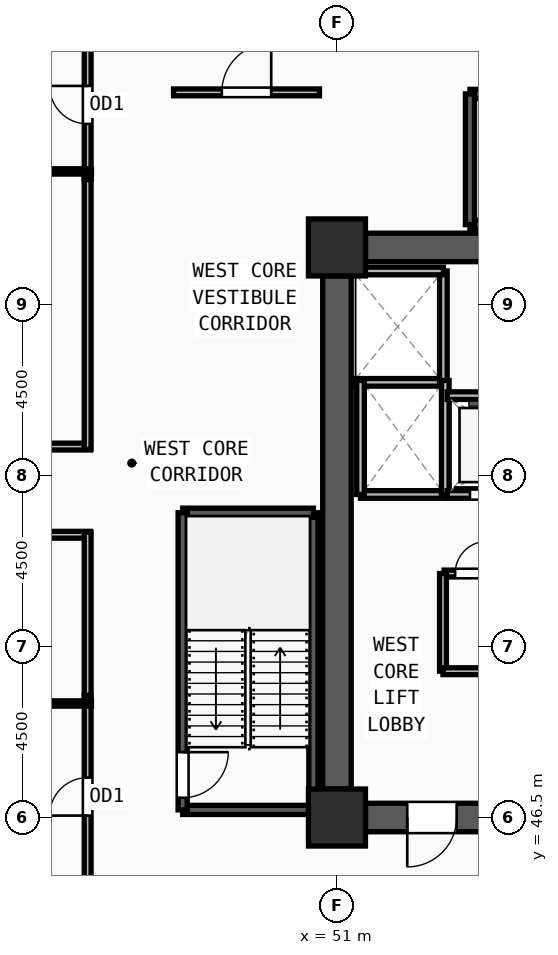
"""IFC4 building model, lengths in metres.
Left out: names, types, materials, properties, quantities, classifications, styles, units other than length and angle.
Written with IfcOpenShell. Run it as: python <this file> out.ifc"""

import sys

from ifc_helpers import new_model, si_unit, direction, frame, frame_2d, origin, origin_2d, place, context, subcontext, project, spatial, rectangle, extrude, source, transform, mapped, element, fill, save


model = new_model("IFC4")
c1 = context("Model", 3, precision=1e-05, world=origin(), true_north=direction((0.0, 1.0)))
c2 = subcontext(c1, "Body", "Model", "MODEL_VIEW")
j1 = project(units=[si_unit("LENGTHUNIT", "METRE"), si_unit("PLANEANGLEUNIT", "RADIAN")], contexts=[c1])
p1 = place(None, origin())
s1 = spatial("IfcSite", under=j1, at=p1, CompositionType="ELEMENT")
p2 = place(p1, origin())
s2 = spatial("IfcBuilding", under=s1, at=p2, CompositionType="ELEMENT")
p3 = place(p2, frame((0.0, 0.0, 177.75)))
s3 = spatial("IfcBuildingStorey", under=s2, at=p3, CompositionType="ELEMENT", Elevation=177.75)
m1 = source(origin(), c2, "Body", "SweptSolid", [
    extrude(rectangle(XDim=1.5, YDim=1.5, at=origin_2d()), origin(), (0.0, 0.0, 1.0), 3.75),
])
for number, where, z_axis, x_axis in (
    (1, (51.0, 46.5, 0.0), (0.0, 0.0, 1.0), (1.0, 0.0, 0.0)),
    (2, (51.0, 61.5, 0.0), (0.0, 0.0, 1.0), (1.0, 0.0, 0.0)),
):
    element("IfcColumn", number, at=place(p3, frame(where, z_axis=z_axis, x_axis=x_axis)), inside=s3, PredefinedType="COLUMN", context=c2, shape_type="MappedRepresentation", body=[
        mapped(m1, transform((0.0, 0.0, 0.0), x_axis=(1.0, 0.0, 0.0), y_axis=(0.0, 1.0, 0.0), z_axis=(0.0, 0.0, 1.0), scale=1.0)),
    ])
p4 = place(p3, frame((51.75, 61.5, 0.0), z_axis=(0.0, 0.0, 1.0), x_axis=(1.0, 0.0, 0.0)))
e3 = element("IfcWall", 3, at=p4, inside=s3, PredefinedType="SHEAR", context=c2, shape_type="SweptSolid", body=[
    extrude(rectangle(XDim=7.5, YDim=0.75, at=frame_2d((3.75, 0.0))), origin(), (0.0, 0.0, 1.0), 3.57),
])
p5 = place(p3, frame((59.25, 46.5, 0.0), z_axis=(0.0, 0.0, 1.0), x_axis=(-1.0, 0.0, 0.0)))
e4 = element("IfcWall", 4, at=p5, inside=s3, PredefinedType="SHEAR", context=c2, shape_type="SweptSolid", body=[
    extrude(rectangle(XDim=7.5, YDim=0.75, at=frame_2d((3.75, 0.0))), origin(), (0.0, 0.0, 1.0), 3.57),
])
m2 = source(origin(), c2, "Body", "SweptSolid", [
    extrude(rectangle(XDim=1.3, YDim=2.2, at=frame_2d((0.65, 1.1))), frame((0.0, 0.385, 0.0), z_axis=(0.0, -1.0, 0.0), x_axis=(1.0, 0.0, 0.0)), (0.0, 0.0, 1.0), 0.77),
])
p6 = place(p5, frame((5.1, 0.0, 0.0)))
e5 = element("IfcOpeningElement", 5, at=p6, cuts=e4, PredefinedType="OPENING", context=c2, shape_type="MappedRepresentation", body=[
    mapped(m2, transform((0.0, 0.0, 0.0), x_axis=(1.0, 0.0, 0.0), y_axis=(0.0, 1.0, 0.0), z_axis=(0.0, 0.0, 1.0), scale=1.0)),
])
m3 = source(origin(), c2, "Body", "SweptSolid", [
    extrude(rectangle(XDim=1.0, YDim=2.2, at=frame_2d((0.5, 1.1))), frame((0.0, 0.385, 0.0), z_axis=(0.0, -1.0, 0.0), x_axis=(1.0, 0.0, 0.0)), (0.0, 0.0, 1.0), 0.77),
])
p7 = place(p5, frame((0.6, 0.0, 0.0)))
e6 = element("IfcOpeningElement", 6, at=p7, cuts=e4, PredefinedType="OPENING", context=c2, shape_type="MappedRepresentation", body=[
    mapped(m3, transform((0.0, 0.0, 0.0), x_axis=(1.0, 0.0, 0.0), y_axis=(0.0, 1.0, 0.0), z_axis=(0.0, 0.0, 1.0), scale=1.0)),
])
p8 = place(p3, frame((51.0, 47.25, 0.0), z_axis=(0.0, 0.0, 1.0), x_axis=(0.0, 1.0, 0.0)))
e7 = element("IfcWall", 7, at=p8, inside=s3, PredefinedType="SHEAR", context=c2, shape_type="SweptSolid", body=[
    extrude(rectangle(XDim=13.5, YDim=0.75, at=frame_2d((6.75, 0.0))), origin(), (0.0, 0.0, 1.0), 3.57),
])
p9 = place(p3, frame((46.94, 46.7, 0.0), z_axis=(0.0, 0.0, 1.0), x_axis=(1.0, 0.0, 0.0)))
e8 = element("IfcWall", 8, at=p9, inside=s3, PredefinedType="SOLIDWALL", context=c2, shape_type="SweptSolid", body=[
    extrude(rectangle(XDim=3.44, YDim=0.24, at=frame_2d((1.72, 0.0))), origin(), (0.0, 0.0, 1.0), 3.57),
])
p10 = place(p3, frame((50.38, 46.7, 0.0), z_axis=(0.0, 0.0, 1.0), x_axis=(0.0, 1.0, 0.0)))
e9 = element("IfcWall", 9, at=p10, inside=s3, PredefinedType="SOLIDWALL", context=c2, shape_type="SweptSolid", body=[
    extrude(rectangle(XDim=7.82, YDim=0.24, at=frame_2d((3.91, 0.0))), origin(), (0.0, 0.0, 1.0), 3.57),
])
p11 = place(p3, frame((50.38, 54.52, 0.0), z_axis=(0.0, 0.0, 1.0), x_axis=(-1.0, 0.0, 0.0)))
e10 = element("IfcWall", 10, at=p11, inside=s3, PredefinedType="SOLIDWALL", context=c2, shape_type="SweptSolid", body=[
    extrude(rectangle(XDim=3.44, YDim=0.24, at=frame_2d((1.72, 0.0))), origin(), (0.0, 0.0, 1.0), 3.57),
])
p12 = place(p3, frame((46.94, 54.52, 0.0), z_axis=(0.0, 0.0, 1.0), x_axis=(0.0, -1.0, 0.0)))
e11 = element("IfcWall", 11, at=p12, inside=s3, PredefinedType="SOLIDWALL", context=c2, shape_type="SweptSolid", body=[
    extrude(rectangle(XDim=7.82, YDim=0.24, at=frame_2d((3.91, 0.0))), origin(), (0.0, 0.0, 1.0), 3.57),
])
m4 = source(origin(), c2, "Body", "SweptSolid", [
    extrude(rectangle(XDim=1.2, YDim=2.2, at=frame_2d((0.6, 1.1))), frame((0.0, 0.13, 0.0), z_axis=(0.0, -1.0, 0.0), x_axis=(1.0, 0.0, 0.0)), (0.0, 0.0, 1.0), 0.26),
])
p13 = place(p12, frame((6.3, 0.0, 0.0)))
e12 = element("IfcOpeningElement", 12, at=p13, cuts=e11, PredefinedType="OPENING", context=c2, shape_type="MappedRepresentation", body=[
    mapped(m4, transform((0.0, 0.0, 0.0), x_axis=(1.0, 0.0, 0.0), y_axis=(0.0, 1.0, 0.0), z_axis=(0.0, 0.0, 1.0), scale=1.0)),
])
p14 = place(p3, frame((54.5, 62.1, 0.0), z_axis=(0.0, 0.0, 1.0), x_axis=(1.0, 0.0, 0.0)))
e13 = element("IfcWall", 13, at=p14, inside=s3, PredefinedType="SOLIDWALL", context=c2, shape_type="SweptSolid", body=[
    extrude(rectangle(XDim=7.82, YDim=0.24, at=frame_2d((3.91, 0.0))), origin(), (0.0, 0.0, 1.0), 3.57),
])
p15 = place(p3, frame((62.32, 65.54, 0.0), z_axis=(0.0, 0.0, 1.0), x_axis=(-1.0, 0.0, 0.0)))
e14 = element("IfcWall", 14, at=p15, inside=s3, PredefinedType="SOLIDWALL", context=c2, shape_type="SweptSolid", body=[
    extrude(rectangle(XDim=7.82, YDim=0.24, at=frame_2d((3.91, 0.0))), origin(), (0.0, 0.0, 1.0), 3.57),
])
p16 = place(p15, frame((6.3, 0.0, 0.0)))
e15 = element("IfcOpeningElement", 15, at=p16, cuts=e14, PredefinedType="OPENING", context=c2, shape_type="MappedRepresentation", body=[
    mapped(m4, transform((0.0, 0.0, 0.0), x_axis=(1.0, 0.0, 0.0), y_axis=(0.0, 1.0, 0.0), z_axis=(0.0, 0.0, 1.0), scale=1.0)),
])
p17 = place(p3, frame((54.5, 65.54, 0.0), z_axis=(0.0, 0.0, 1.0), x_axis=(0.0, -1.0, 0.0)))
e16 = element("IfcWall", 16, at=p17, inside=s3, PredefinedType="SOLIDWALL", context=c2, shape_type="SweptSolid", body=[
    extrude(rectangle(XDim=3.44, YDim=0.24, at=frame_2d((1.72, 0.0))), origin(), (0.0, 0.0, 1.0), 3.57),
])
p18 = place(p3, frame((51.4, 57.95, 0.0), z_axis=(0.0, 0.0, 1.0), x_axis=(1.0, 0.0, 0.0)))
e17 = element("IfcWall", 17, at=p18, inside=s3, PredefinedType="SOLIDWALL", context=c2, shape_type="SweptSolid", body=[
    extrude(rectangle(XDim=2.4, YDim=0.2, at=frame_2d((1.2, 0.0))), origin(), (0.0, 0.0, 1.0), 3.57),
])
p19 = place(p3, frame((53.8, 57.95, 0.0), z_axis=(0.0, 0.0, 1.0), x_axis=(0.0, 1.0, 0.0)))
e18 = element("IfcWall", 18, at=p19, inside=s3, PredefinedType="SOLIDWALL", context=c2, shape_type="SweptSolid", body=[
    extrude(rectangle(XDim=2.93, YDim=0.2, at=frame_2d((1.465, 0.0))), origin(), (0.0, 0.0, 1.0), 3.57),
])
p20 = place(p3, frame((53.8, 60.88, 0.0), z_axis=(0.0, 0.0, 1.0), x_axis=(-1.0, 0.0, 0.0)))
e19 = element("IfcWall", 19, at=p20, inside=s3, PredefinedType="SOLIDWALL", context=c2, shape_type="SweptSolid", body=[
    extrude(rectangle(XDim=2.4, YDim=0.2, at=frame_2d((1.2, 0.0))), origin(), (0.0, 0.0, 1.0), 3.57),
])
p21 = place(p3, frame((51.62, 55.0, 0.0), z_axis=(0.0, 0.0, 1.0), x_axis=(1.0, 0.0, 0.0)))
e20 = element("IfcWall", 20, at=p21, inside=s3, PredefinedType="SOLIDWALL", context=c2, shape_type="SweptSolid", body=[
    extrude(rectangle(XDim=2.23, YDim=0.2, at=frame_2d((1.115, 0.0))), origin(), (0.0, 0.0, 1.0), 3.57),
])
for number, where, z_axis, x_axis in (
    (21, (53.85, 55.0, 0.0), (0.0, 0.0, 1.0), (0.0, 1.0, 0.0)),
    (22, (51.62, 58.0, 0.0), (0.0, 0.0, 1.0), (0.0, -1.0, 0.0)),
):
    element("IfcWall", number, at=place(p3, frame(where, z_axis=z_axis, x_axis=x_axis)), inside=s3, PredefinedType="SOLIDWALL", context=c2, shape_type="SweptSolid", body=[
        extrude(rectangle(XDim=3.0, YDim=0.2, at=frame_2d((1.5, 0.0))), origin(), (0.0, 0.0, 1.0), 3.57),
    ])
p22 = place(p3, frame((53.9, 55.0, 0.0), z_axis=(0.0, 0.0, 1.0), x_axis=(1.0, 0.0, 0.0)))
e23 = element("IfcWall", 23, at=p22, inside=s3, PredefinedType="SOLIDWALL", context=c2, shape_type="SweptSolid", body=[
    extrude(rectangle(XDim=2.3, YDim=0.2, at=frame_2d((1.15, 0.0))), origin(), (0.0, 0.0, 1.0), 3.57),
])
m5 = source(origin(), c2, "Body", "SweptSolid", [
    extrude(rectangle(XDim=1.1, YDim=2.2, at=frame_2d((0.55, 1.1))), frame((0.0, 0.11, 0.0), z_axis=(0.0, -1.0, 0.0), x_axis=(1.0, 0.0, 0.0)), (0.0, 0.0, 1.0), 0.22),
])
p23 = place(p22, frame((0.6, 0.0, 0.0)))
e24 = element("IfcOpeningElement", 24, at=p23, cuts=e23, PredefinedType="OPENING", context=c2, shape_type="MappedRepresentation", body=[
    mapped(m5, transform((0.0, 0.0, 0.0), x_axis=(1.0, 0.0, 0.0), y_axis=(0.0, 1.0, 0.0), z_axis=(0.0, 0.0, 1.0), scale=1.0)),
])
p24 = place(p3, frame((56.2, 57.6, 0.0), z_axis=(0.0, 0.0, 1.0), x_axis=(-1.0, 0.0, 0.0)))
e25 = element("IfcWall", 25, at=p24, inside=s3, PredefinedType="SOLIDWALL", context=c2, shape_type="SweptSolid", body=[
    extrude(rectangle(XDim=2.3, YDim=0.2, at=frame_2d((1.15, 0.0))), origin(), (0.0, 0.0, 1.0), 3.57),
])
p25 = place(p3, frame((53.82, 52.92, 0.0), z_axis=(0.0, 0.0, 1.0), x_axis=(1.0, 0.0, 0.0)))
e26 = element("IfcWall", 26, at=p25, inside=s3, PredefinedType="PARTITIONING", context=c2, shape_type="SweptSolid", body=[
    extrude(rectangle(XDim=1.43, YDim=0.18, at=frame_2d((0.715, 0.0))), origin(), (0.0, 0.0, 1.0), 3.57),
])
m6 = source(origin(), c2, "Body", "SweptSolid", [
    extrude(rectangle(XDim=0.85, YDim=2.1, at=frame_2d((0.425, 1.05))), frame((0.0, 0.1, 0.0), z_axis=(0.0, -1.0, 0.0), x_axis=(1.0, 0.0, 0.0)), (0.0, 0.0, 1.0), 0.2),
])
p26 = place(p25, frame((0.29, 0.0, 0.0)))
e27 = element("IfcOpeningElement", 27, at=p26, cuts=e26, PredefinedType="OPENING", context=c2, shape_type="MappedRepresentation", body=[
    mapped(m6, transform((0.0, 0.0, 0.0), x_axis=(1.0, 0.0, 0.0), y_axis=(0.0, 1.0, 0.0), z_axis=(0.0, 0.0, 1.0), scale=1.0)),
])
p27 = place(p3, frame((46.7, 65.58, 0.0), z_axis=(0.0, 0.0, 1.0), x_axis=(1.0, 0.0, 0.0)))
e28 = element("IfcWall", 28, at=p27, inside=s3, PredefinedType="PARTITIONING", context=c2, shape_type="SweptSolid", body=[
    extrude(rectangle(XDim=3.84, YDim=0.18, at=frame_2d((1.92, 0.0))), origin(), (0.0, 0.0, 1.0), 3.57),
])
m7 = source(origin(), c2, "Body", "SweptSolid", [
    extrude(rectangle(XDim=1.3, YDim=2.2, at=frame_2d((0.65, 1.1))), frame((0.0, 0.1, 0.0), z_axis=(0.0, -1.0, 0.0), x_axis=(1.0, 0.0, 0.0)), (0.0, 0.0, 1.0), 0.2),
])
p28 = place(p27, frame((1.27, 0.0, 0.0)))
e29 = element("IfcOpeningElement", 29, at=p28, cuts=e28, PredefinedType="OPENING", context=c2, shape_type="MappedRepresentation", body=[
    mapped(m7, transform((0.0, 0.0, 0.0), x_axis=(1.0, 0.0, 0.0), y_axis=(0.0, 1.0, 0.0), z_axis=(0.0, 0.0, 1.0), scale=1.0)),
])
p29 = place(p3, frame((44.44, 63.285, 0.0), z_axis=(0.0, 0.0, 1.0), x_axis=(0.0, 1.0, 0.0)))
e30 = element("IfcWall", 30, at=p29, inside=s3, PredefinedType="PARTITIONING", context=c2, shape_type="SweptSolid", body=[
    extrude(rectangle(XDim=3.93, YDim=0.18, at=frame_2d((1.965, 0.0))), origin(), (0.0, 0.0, 1.0), 3.57),
])
m8 = source(origin(), c2, "Body", "SweptSolid", [
    extrude(rectangle(XDim=1.0, YDim=2.2, at=frame_2d((0.5, 1.1))), frame((0.0, 0.1, 0.0), z_axis=(0.0, -1.0, 0.0), x_axis=(1.0, 0.0, 0.0)), (0.0, 0.0, 1.0), 0.2),
])
p30 = place(p29, frame((1.465, 0.0, 0.0)))
e31 = element("IfcOpeningElement", 31, at=p30, cuts=e30, PredefinedType="OPENING", context=c2, shape_type="MappedRepresentation", body=[
    mapped(m8, transform((0.0, 0.0, 0.0), x_axis=(1.0, 0.0, 0.0), y_axis=(0.0, 1.0, 0.0), z_axis=(0.0, 0.0, 1.0), scale=1.0)),
])
p31 = place(p3, frame((30.529, 56.26, 0.0), z_axis=(0.0, 0.0, 1.0), x_axis=(1.0, 0.0, 0.0)))
e32 = element("IfcWall", 32, at=p31, inside=s3, PredefinedType="PARTITIONING", context=c2, shape_type="SweptSolid", body=[
    extrude(rectangle(XDim=13.981, YDim=0.18, at=frame_2d((6.99, 0.0))), origin(), (0.0, 0.0, 1.0), 3.57),
])
p32 = place(p31, frame((6.49, 0.0, 0.0)))
e33 = element("IfcOpeningElement", 33, at=p32, cuts=e32, PredefinedType="OPENING", context=c2, shape_type="MappedRepresentation", body=[
    mapped(m8, transform((0.0, 0.0, 0.0), x_axis=(1.0, 0.0, 0.0), y_axis=(0.0, 1.0, 0.0), z_axis=(0.0, 0.0, 1.0), scale=1.0)),
])
p33 = place(p3, frame((44.51, 53.94, 0.0), z_axis=(0.0, 0.0, 1.0), x_axis=(-1.0, 0.0, 0.0)))
e34 = element("IfcWall", 34, at=p33, inside=s3, PredefinedType="PARTITIONING", context=c2, shape_type="SweptSolid", body=[
    extrude(rectangle(XDim=12.823, YDim=0.18, at=frame_2d((6.412, 0.0))), origin(), (0.0, 0.0, 1.0), 3.57),
])
p34 = place(p33, frame((5.911, 0.0, 0.0)))
e35 = element("IfcOpeningElement", 35, at=p34, cuts=e34, PredefinedType="OPENING", context=c2, shape_type="MappedRepresentation", body=[
    mapped(m8, transform((0.0, 0.0, 0.0), x_axis=(1.0, 0.0, 0.0), y_axis=(0.0, 1.0, 0.0), z_axis=(0.0, 0.0, 1.0), scale=1.0)),
])
p35 = place(p3, frame((44.44, 44.385, 0.0), z_axis=(0.0, 0.0, 1.0), x_axis=(0.0, 1.0, 0.0)))
e36 = element("IfcWall", 36, at=p35, inside=s3, PredefinedType="PARTITIONING", context=c2, shape_type="SweptSolid", body=[
    extrude(rectangle(XDim=5.33, YDim=0.18, at=frame_2d((2.665, 0.0))), origin(), (0.0, 0.0, 1.0), 3.57),
])
p36 = place(p35, frame((2.165, 0.0, 0.0)))
e37 = element("IfcOpeningElement", 37, at=p36, cuts=e36, PredefinedType="OPENING", context=c2, shape_type="MappedRepresentation", body=[
    mapped(m8, transform((0.0, 0.0, 0.0), x_axis=(1.0, 0.0, 0.0), y_axis=(0.0, 1.0, 0.0), z_axis=(0.0, 0.0, 1.0), scale=1.0)),
])
p37 = place(p3, frame((53.79, 50.35, 0.0), z_axis=(0.0, 0.0, 1.0), x_axis=(0.0, 1.0, 0.0)))
e38 = element("IfcWall", 38, at=p37, inside=s3, PredefinedType="PARTITIONING", context=c2, shape_type="SweptSolid", body=[
    extrude(rectangle(XDim=2.57, YDim=0.18, at=frame_2d((1.285, 0.0))), origin(), (0.0, 0.0, 1.0), 3.57),
])
p38 = place(p3, frame((53.79, 50.35, 0.0), z_axis=(0.0, 0.0, 1.0), x_axis=(1.0, 0.0, 0.0)))
e39 = element("IfcWall", 39, at=p38, inside=s3, PredefinedType="PARTITIONING", context=c2, shape_type="SweptSolid", body=[
    extrude(rectangle(XDim=1.49, YDim=0.18, at=frame_2d((0.745, 0.0))), origin(), (0.0, 0.0, 1.0), 3.57),
])
p39 = place(p3, frame((44.44, 56.19, 0.0), z_axis=(0.0, 0.0, 1.0), x_axis=(0.0, 1.0, 0.0)))
e40 = element("IfcWall", 40, at=p39, inside=s3, PredefinedType="PARTITIONING", context=c2, shape_type="SweptSolid", body=[
    extrude(rectangle(XDim=7.095, YDim=0.18, at=frame_2d((3.547, 0.0))), origin(), (0.0, 0.0, 1.0), 3.57),
])
p40 = place(p3, frame((44.44, 49.715, 0.0), z_axis=(0.0, 0.0, 1.0), x_axis=(0.0, 1.0, 0.0)))
e41 = element("IfcWall", 41, at=p40, inside=s3, PredefinedType="PARTITIONING", context=c2, shape_type="SweptSolid", body=[
    extrude(rectangle(XDim=4.295, YDim=0.18, at=frame_2d((2.147, 0.0))), origin(), (0.0, 0.0, 1.0), 3.57),
])
p41 = place(p3, frame((44.54, 49.5, 0.0), z_axis=(0.0, 0.0, 1.0), x_axis=(-1.0, 0.0, 0.0)))
e42 = element("IfcWall", 42, at=p41, inside=s3, PredefinedType="PARTITIONING", context=c2, shape_type="SweptSolid", body=[
    extrude(rectangle(XDim=10.746, YDim=0.14, at=frame_2d((5.373, 0.0))), origin(), (0.0, 0.0, 1.0), 3.57),
])
p42 = place(p3, frame((44.54, 63.5, 0.0), z_axis=(0.0, 0.0, 1.0), x_axis=(-1.0, 0.0, 0.0)))
e43 = element("IfcWall", 43, at=p42, inside=s3, PredefinedType="PARTITIONING", context=c2, shape_type="SweptSolid", body=[
    extrude(rectangle(XDim=17.733, YDim=0.14, at=frame_2d((8.867, 0.0))), origin(), (0.0, 0.0, 1.0), 2.755),
])
m9 = source(origin(), c2, "Body", "SweptSolid", [
    extrude(rectangle(XDim=1.3, YDim=2.2, at=frame_2d((0.65, 1.1))), frame((0.0, 0.025, 0.0), z_axis=(0.0, -1.0, 0.0), x_axis=(1.0, 0.0, 0.0)), (0.0, 0.0, 1.0), 0.05),
])
p43 = place(p6, origin())
e44 = element("IfcDoor", 44, at=p43, inside=s3, OperationType="SINGLE_SWING_RIGHT", PredefinedType="DOOR", context=c2, shape_type="MappedRepresentation", body=[
    mapped(m9, transform((0.0, 0.0, 0.0), x_axis=(1.0, 0.0, 0.0), y_axis=(0.0, 1.0, 0.0), z_axis=(0.0, 0.0, 1.0), scale=1.0)),
])
fill(e5, e44)
m10 = source(origin(), c2, "Body", "SweptSolid", [
    extrude(rectangle(XDim=1.2, YDim=2.2, at=frame_2d((0.6, 1.1))), frame((0.0, 0.025, 0.0), z_axis=(0.0, -1.0, 0.0), x_axis=(1.0, 0.0, 0.0)), (0.0, 0.0, 1.0), 0.05),
])
p44 = place(p13, origin())
e45 = element("IfcDoor", 45, at=p44, inside=s3, OperationType="SINGLE_SWING_LEFT", PredefinedType="DOOR", context=c2, shape_type="MappedRepresentation", body=[
    mapped(m10, transform((0.0, 0.0, 0.0), x_axis=(1.0, 0.0, 0.0), y_axis=(0.0, 1.0, 0.0), z_axis=(0.0, 0.0, 1.0), scale=1.0)),
])
fill(e12, e45)
m11 = source(origin(), c2, "Body", "SweptSolid", [
    extrude(rectangle(XDim=1.1, YDim=2.2, at=frame_2d((0.55, 1.1))), frame((0.0, 0.025, 0.0), z_axis=(0.0, -1.0, 0.0), x_axis=(1.0, 0.0, 0.0)), (0.0, 0.0, 1.0), 0.05),
])
p45 = place(p23, origin())
e46 = element("IfcDoor", 46, at=p45, inside=s3, OperationType="SLIDING_TO_LEFT", PredefinedType="DOOR", context=c2, shape_type="MappedRepresentation", body=[
    mapped(m11, transform((0.0, 0.0, 0.0), x_axis=(1.0, 0.0, 0.0), y_axis=(0.0, 1.0, 0.0), z_axis=(0.0, 0.0, 1.0), scale=1.0)),
])
fill(e24, e46)
m12 = source(origin(), c2, "Body", "SweptSolid", [
    extrude(rectangle(XDim=0.85, YDim=2.1, at=frame_2d((0.425, 1.05))), frame((0.0, 0.025, 0.0), z_axis=(0.0, -1.0, 0.0), x_axis=(1.0, 0.0, 0.0)), (0.0, 0.0, 1.0), 0.05),
])
p46 = place(p26, origin())
e47 = element("IfcDoor", 47, at=p46, inside=s3, OperationType="SINGLE_SWING_RIGHT", PredefinedType="DOOR", context=c2, shape_type="MappedRepresentation", body=[
    mapped(m12, transform((0.0, 0.0, 0.0), x_axis=(1.0, 0.0, 0.0), y_axis=(0.0, 1.0, 0.0), z_axis=(0.0, 0.0, 1.0), scale=1.0)),
])
fill(e27, e47)
p47 = place(p28, origin())
e48 = element("IfcDoor", 48, at=p47, inside=s3, OperationType="SINGLE_SWING_RIGHT", PredefinedType="DOOR", context=c2, shape_type="MappedRepresentation", body=[
    mapped(m9, transform((0.0, 0.0, 0.0), x_axis=(1.0, 0.0, 0.0), y_axis=(0.0, 1.0, 0.0), z_axis=(0.0, 0.0, 1.0), scale=1.0)),
])
fill(e29, e48)
m13 = source(origin(), c2, "Body", "SweptSolid", [
    extrude(rectangle(XDim=1.0, YDim=2.2, at=frame_2d((0.5, 1.1))), frame((0.0, 0.025, 0.0), z_axis=(0.0, -1.0, 0.0), x_axis=(1.0, 0.0, 0.0)), (0.0, 0.0, 1.0), 0.05),
])
p48 = place(p30, origin())
e49 = element("IfcDoor", 49, at=p48, inside=s3, OperationType="SINGLE_SWING_RIGHT", PredefinedType="DOOR", context=c2, shape_type="MappedRepresentation", body=[
    mapped(m13, transform((0.0, 0.0, 0.0), x_axis=(1.0, 0.0, 0.0), y_axis=(0.0, 1.0, 0.0), z_axis=(0.0, 0.0, 1.0), scale=1.0)),
])
fill(e31, e49)
p49 = place(p36, origin())
e50 = element("IfcDoor", 50, at=p49, inside=s3, OperationType="SINGLE_SWING_LEFT", PredefinedType="DOOR", context=c2, shape_type="MappedRepresentation", body=[
    mapped(m13, transform((0.0, 0.0, 0.0), x_axis=(1.0, 0.0, 0.0), y_axis=(0.0, 1.0, 0.0), z_axis=(0.0, 0.0, 1.0), scale=1.0)),
])
fill(e37, e50)
save(model, sys.argv[1])
